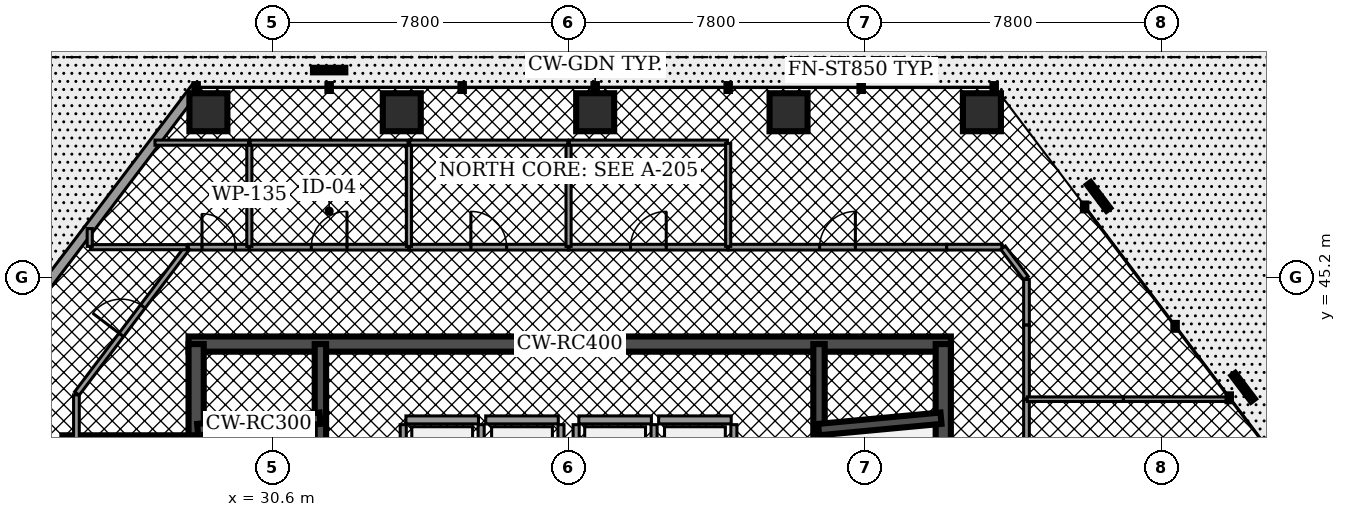
"""IFC4 building model, lengths in metres.
Left out: names, types, materials, properties, quantities, classifications, styles, units other than length and angle.
Written with IfcOpenShell. Run it as: python <this file> out.ifc"""

import sys

from ifc_helpers import new_model, si_unit, direction, frame, frame_2d, origin, origin_2d, place, context, subcontext, project, spatial, rectangle, hollow_rectangle, extrude, element, fill, save


model = new_model("IFC4")
c1 = context("Model", 3, precision=1e-05, world=origin(), true_north=direction((0.0, 1.0)))
c2 = subcontext(c1, "Body", "Model", "MODEL_VIEW")
j1 = project(units=[si_unit("LENGTHUNIT", "METRE"), si_unit("PLANEANGLEUNIT", "RADIAN")], contexts=[c1])
p1 = place(None, origin())
s1 = spatial("IfcSite", under=j1, at=p1, CompositionType="ELEMENT")
p2 = place(p1, origin())
s2 = spatial("IfcBuilding", under=s1, at=p2, CompositionType="ELEMENT")
p3 = place(p2, frame((0.0, 0.0, 22.78)))
s3 = spatial("IfcBuildingStorey", under=s2, at=p3, CompositionType="ELEMENT", Elevation=22.78)
p4 = place(p3, frame((28.4, 43.45, 0.0), z_axis=(0.0, 0.0, 1.0), x_axis=(1.0, 0.0, 0.0)))
e1 = element("IfcWall", 1, at=p4, inside=s3, PredefinedType="SHEAR", context=c2, shape_type="SweptSolid", body=[
    extrude(rectangle(XDim=20.06, YDim=0.4, at=frame_2d((10.03, 0.0))), origin(), (0.0, 0.0, 1.0), 4.5),
])
p5 = place(p3, frame((28.6, 33.25, 0.0), z_axis=(0.0, 0.0, 1.0), x_axis=(0.0, 1.0, 0.0)))
e2 = element("IfcWall", 2, at=p5, inside=s3, PredefinedType="SHEAR", context=c2, shape_type="SweptSolid", body=[
    extrude(rectangle(XDim=10.2, YDim=0.4, at=frame_2d((5.1, 0.0))), origin(), (0.0, 0.0, 1.0), 4.5),
])
for number, where, z_axis, x_axis in (
    (3, (31.87, 33.25, 0.0), (0.0, 0.0, 1.0), (0.0, 1.0, 0.0)),
    (4, (44.99, 33.25, 0.0), (0.0, 0.0, 1.0), (0.0, 1.0, 0.0)),
):
    element("IfcWall", number, at=place(p3, frame(where, z_axis=z_axis, x_axis=x_axis)), inside=s3, PredefinedType="SHEAR", context=c2, shape_type="SweptSolid", body=[
        extrude(rectangle(XDim=10.2, YDim=0.3, at=frame_2d((5.1, 0.0))), origin(), (0.0, 0.0, 1.0), 4.5),
    ])
p6 = place(p3, frame((48.26, 33.25, 0.0), z_axis=(0.0, 0.0, 1.0), x_axis=(0.0, 1.0, 0.0)))
e5 = element("IfcWall", 5, at=p6, inside=s3, PredefinedType="SHEAR", context=c2, shape_type="SweptSolid", body=[
    extrude(rectangle(XDim=10.2, YDim=0.4, at=frame_2d((5.1, 0.0))), origin(), (0.0, 0.0, 1.0), 4.5),
])
p7 = place(p3, frame((28.64, 41.2, 0.0), z_axis=(0.0, 0.0, 1.0), x_axis=(0.995687118776, 0.092774789157, 0.0)))
e6 = element("IfcWall", 6, at=p7, inside=s3, PredefinedType="SHEAR", context=c2, shape_type="SweptSolid", body=[
    extrude(rectangle(XDim=3.234, YDim=0.3, at=frame_2d((1.617, 0.0))), origin(), (0.0, 0.0, 1.0), 4.5),
])
p8 = place(p3, frame((44.98, 41.2, 0.0), z_axis=(0.0, 0.0, 1.0), x_axis=(0.995686468965, 0.09278176286, 0.0)))
e7 = element("IfcWall", 7, at=p8, inside=s3, PredefinedType="SHEAR", context=c2, shape_type="SweptSolid", body=[
    extrude(rectangle(XDim=3.234, YDim=0.3, at=frame_2d((1.617, 0.0))), origin(), (0.0, 0.0, 1.0), 4.5),
])
p9 = place(p3, frame((25.08, 40.9, 0.0), z_axis=(0.0, 0.0, 1.0), x_axis=(1.0, 0.0, 0.0)))
e8 = element("IfcWall", 8, at=p9, inside=s3, PredefinedType="SHEAR", context=c2, shape_type="SweptSolid", body=[
    extrude(rectangle(XDim=3.52, YDim=0.3, at=frame_2d((1.76, 0.0))), origin(), (0.0, 0.0, 1.0), 4.5),
])
p10 = place(p3, frame((49.277, 49.55, 0.0), z_axis=(0.0420077433, -0.008672566359, 0.999079644521), x_axis=(0.202187723277, 0.979346784625, 0.0)))
e9 = element("IfcColumn", 9, at=p10, inside=s3, PredefinedType="COLUMN", context=c2, shape_type="SweptSolid", body=[
    extrude(hollow_rectangle(XDim=1.0, YDim=1.0, WallThickness=0.05, at=origin_2d()), origin(), (0.0, 0.0, 1.0), 4.504),
])
p11 = place(p3, frame((44.188, 49.55, 0.0), z_axis=(0.020448511934, -0.008678413553, 0.999753241304), x_axis=(0.390675254549, 0.920528568532, 0.0)))
e10 = element("IfcColumn", 10, at=p11, inside=s3, PredefinedType="COLUMN", context=c2, shape_type="SweptSolid", body=[
    extrude(hollow_rectangle(XDim=1.0, YDim=1.0, WallThickness=0.05, at=origin_2d()), origin(), (0.0, 0.0, 1.0), 4.501),
])
p12 = place(p3, frame((39.1, 49.55, 0.0), z_axis=(-0.001247781879, -0.008680221768, 0.999961547656), x_axis=(0.989825386618, -0.142287399326, 0.0)))
e11 = element("IfcColumn", 11, at=p12, inside=s3, PredefinedType="COLUMN", context=c2, shape_type="SweptSolid", body=[
    extrude(hollow_rectangle(XDim=1.0, YDim=1.0, WallThickness=0.05, at=origin_2d()), origin(), (0.0, 0.0, 1.0), 4.5),
])
p13 = place(p3, frame((34.011, 49.55, 0.0), z_axis=(-0.022888105236, -0.008677954592, 0.999700368982), x_axis=(0.354520640342, -0.935048188903, 0.0)))
e12 = element("IfcColumn", 12, at=p13, inside=s3, PredefinedType="COLUMN", context=c2, shape_type="SweptSolid", body=[
    extrude(hollow_rectangle(XDim=1.0, YDim=1.0, WallThickness=0.05, at=origin_2d()), origin(), (0.0, 0.0, 1.0), 4.501),
])
p14 = place(p3, frame((28.923, 49.55, 0.0), z_axis=(-0.044550397698, -0.008671610257, 0.998969501657), x_axis=(0.191061427152, -0.981578081996, 0.0)))
e13 = element("IfcColumn", 13, at=p14, inside=s3, PredefinedType="COLUMN", context=c2, shape_type="SweptSolid", body=[
    extrude(hollow_rectangle(XDim=1.0, YDim=1.0, WallThickness=0.05, at=origin_2d()), origin(), (0.0, 0.0, 1.0), 4.505),
])
p15 = place(p3, frame((16.0, 33.568, 0.0), z_axis=(0.0, 0.0, 1.0), x_axis=(0.603864446157, 0.797087028289, 0.0)))
e14 = element("IfcWall", 14, at=p15, inside=s3, PredefinedType="STANDARD", context=c2, shape_type="SweptSolid", body=[
    extrude(rectangle(XDim=20.866, YDim=0.26, at=frame_2d((10.433, 0.0))), origin(), (0.0, 0.0, 1.0), 3.65),
])
p16 = place(p15, frame((2.65, 0.0, 0.0)))
e15 = element("IfcOpeningElement", 15, at=p16, cuts=e14, PredefinedType="OPENING", context=c2, shape_type="SweptSolid", body=[
    extrude(rectangle(XDim=1.8, YDim=2.2, at=frame_2d((0.9, 1.1))), frame((0.0, 0.14, 0.0), z_axis=(0.0, -1.0, 0.0), x_axis=(1.0, 0.0, 0.0)), (0.0, 0.0, 1.0), 0.28),
])
p17 = place(p15, frame((5.3, 0.0, 0.75)))
e16 = element("IfcOpeningElement", 16, at=p17, cuts=e14, PredefinedType="OPENING", context=c2, shape_type="SweptSolid", body=[
    extrude(rectangle(XDim=2.1, YDim=2.2, at=frame_2d((1.05, 1.1))), frame((0.0, 0.14, 0.0), z_axis=(0.0, -1.0, 0.0), x_axis=(1.0, 0.0, 0.0)), (0.0, 0.0, 1.0), 0.28),
])
p18 = place(p3, frame((34.12, 41.455, 0.0), z_axis=(0.0, 0.0, 1.0), x_axis=(1.0, 0.0, 0.0)))
e17 = element("IfcWall", 17, at=p18, inside=s3, PredefinedType="SOLIDWALL", context=c2, shape_type="SweptSolid", body=[
    extrude(rectangle(XDim=1.91, YDim=0.21, at=frame_2d((0.955, 0.0))), origin(), (0.0, 0.0, 1.0), 3.472),
])
for number, where, z_axis, x_axis in (
    (18, (34.05, 39.12, 0.0), (0.0, 0.0, 1.0), (0.0, 1.0, 0.0)),
    (19, (36.1, 39.12, 0.0), (0.0, 0.0, 1.0), (0.0, 1.0, 0.0)),
):
    element("IfcWall", number, at=place(p3, frame(where, z_axis=z_axis, x_axis=x_axis)), inside=s3, PredefinedType="SOLIDWALL", context=c2, shape_type="SweptSolid", body=[
        extrude(rectangle(XDim=2.21, YDim=0.16, at=frame_2d((1.105, 0.0))), origin(), (0.0, 0.0, 1.0), 3.472),
    ])
p19 = place(p3, frame((36.22, 41.455, 0.0), z_axis=(0.0, 0.0, 1.0), x_axis=(1.0, 0.0, 0.0)))
e20 = element("IfcWall", 20, at=p19, inside=s3, PredefinedType="SOLIDWALL", context=c2, shape_type="SweptSolid", body=[
    extrude(rectangle(XDim=1.91, YDim=0.21, at=frame_2d((0.955, 0.0))), origin(), (0.0, 0.0, 1.0), 3.472),
])
p20 = place(p3, frame((38.2, 39.12, 0.0), z_axis=(0.0, 0.0, 1.0), x_axis=(0.0, 1.0, 0.0)))
e21 = element("IfcWall", 21, at=p20, inside=s3, PredefinedType="SOLIDWALL", context=c2, shape_type="SweptSolid", body=[
    extrude(rectangle(XDim=2.21, YDim=0.16, at=frame_2d((1.105, 0.0))), origin(), (0.0, 0.0, 1.0), 3.472),
])
p21 = place(p3, frame((38.67, 41.455, 0.0), z_axis=(0.0, 0.0, 1.0), x_axis=(1.0, 0.0, 0.0)))
e22 = element("IfcWall", 22, at=p21, inside=s3, PredefinedType="SOLIDWALL", context=c2, shape_type="SweptSolid", body=[
    extrude(rectangle(XDim=1.91, YDim=0.21, at=frame_2d((0.955, 0.0))), origin(), (0.0, 0.0, 1.0), 3.472),
])
for number, where, z_axis, x_axis in (
    (23, (38.6, 39.12, 0.0), (0.0, 0.0, 1.0), (0.0, 1.0, 0.0)),
    (24, (40.65, 39.12, 0.0), (0.0, 0.0, 1.0), (0.0, 1.0, 0.0)),
):
    element("IfcWall", number, at=place(p3, frame(where, z_axis=z_axis, x_axis=x_axis)), inside=s3, PredefinedType="SOLIDWALL", context=c2, shape_type="SweptSolid", body=[
        extrude(rectangle(XDim=2.21, YDim=0.16, at=frame_2d((1.105, 0.0))), origin(), (0.0, 0.0, 1.0), 3.472),
    ])
p22 = place(p3, frame((40.77, 41.455, 0.0), z_axis=(0.0, 0.0, 1.0), x_axis=(1.0, 0.0, 0.0)))
e25 = element("IfcWall", 25, at=p22, inside=s3, PredefinedType="SOLIDWALL", context=c2, shape_type="SweptSolid", body=[
    extrude(rectangle(XDim=1.91, YDim=0.21, at=frame_2d((0.955, 0.0))), origin(), (0.0, 0.0, 1.0), 3.472),
])
p23 = place(p3, frame((42.75, 39.12, 0.0), z_axis=(0.0, 0.0, 1.0), x_axis=(0.0, 1.0, 0.0)))
e26 = element("IfcWall", 26, at=p23, inside=s3, PredefinedType="SOLIDWALL", context=c2, shape_type="SweptSolid", body=[
    extrude(rectangle(XDim=2.21, YDim=0.16, at=frame_2d((1.105, 0.0))), origin(), (0.0, 0.0, 1.0), 3.472),
])
p24 = place(p3, frame((28.394, 46.0, 0.0), z_axis=(0.0, 0.0, 1.0), x_axis=(1.0, 0.0, 0.0)))
e27 = element("IfcWall", 27, at=p24, inside=s3, PredefinedType="PARTITIONING", context=c2, shape_type="SweptSolid", body=[
    extrude(rectangle(XDim=1.601, YDim=0.15, at=frame_2d((0.801, 0.0))), origin(), (0.0, 0.0, 1.0), 3.457),
])
p25 = place(p24, frame((0.361, 0.0, 0.0)))
e28 = element("IfcOpeningElement", 28, at=p25, cuts=e27, PredefinedType="OPENING", context=c2, shape_type="SweptSolid", body=[
    extrude(rectangle(XDim=0.88, YDim=2.05, at=frame_2d((0.44, 1.025))), frame((0.0, 0.085, 0.0), z_axis=(0.0, -1.0, 0.0), x_axis=(1.0, 0.0, 0.0)), (0.0, 0.0, 1.0), 0.17),
])
p26 = place(p3, frame((30.005, 46.0, 0.0), z_axis=(0.0, 0.0, 1.0), x_axis=(1.0, 0.0, 0.0)))
e29 = element("IfcWall", 29, at=p26, inside=s3, PredefinedType="PARTITIONING", context=c2, shape_type="SweptSolid", body=[
    extrude(rectangle(XDim=4.19, YDim=0.15, at=frame_2d((2.095, 0.0))), origin(), (0.0, 0.0, 1.0), 3.457),
])
p27 = place(p26, frame((1.625, 0.0, 0.0)))
e30 = element("IfcOpeningElement", 30, at=p27, cuts=e29, PredefinedType="OPENING", context=c2, shape_type="SweptSolid", body=[
    extrude(rectangle(XDim=0.94, YDim=2.05, at=frame_2d((0.47, 1.025))), frame((0.0, 0.085, 0.0), z_axis=(0.0, -1.0, 0.0), x_axis=(1.0, 0.0, 0.0)), (0.0, 0.0, 1.0), 0.17),
])
p28 = place(p3, frame((34.205, 46.0, 0.0), z_axis=(0.0, 0.0, 1.0), x_axis=(1.0, 0.0, 0.0)))
e31 = element("IfcWall", 31, at=p28, inside=s3, PredefinedType="PARTITIONING", context=c2, shape_type="SweptSolid", body=[
    extrude(rectangle(XDim=4.19, YDim=0.15, at=frame_2d((2.095, 0.0))), origin(), (0.0, 0.0, 1.0), 3.457),
])
p29 = place(p28, frame((1.625, 0.0, 0.0)))
e32 = element("IfcOpeningElement", 32, at=p29, cuts=e31, PredefinedType="OPENING", context=c2, shape_type="SweptSolid", body=[
    extrude(rectangle(XDim=0.94, YDim=2.05, at=frame_2d((0.47, 1.025))), frame((0.0, 0.085, 0.0), z_axis=(0.0, -1.0, 0.0), x_axis=(1.0, 0.0, 0.0)), (0.0, 0.0, 1.0), 0.17),
])
p30 = place(p3, frame((38.405, 46.0, 0.0), z_axis=(0.0, 0.0, 1.0), x_axis=(1.0, 0.0, 0.0)))
e33 = element("IfcWall", 33, at=p30, inside=s3, PredefinedType="PARTITIONING", context=c2, shape_type="SweptSolid", body=[
    extrude(rectangle(XDim=4.19, YDim=0.15, at=frame_2d((2.095, 0.0))), origin(), (0.0, 0.0, 1.0), 3.457),
])
p31 = place(p30, frame((1.625, 0.0, 0.0)))
e34 = element("IfcOpeningElement", 34, at=p31, cuts=e33, PredefinedType="OPENING", context=c2, shape_type="SweptSolid", body=[
    extrude(rectangle(XDim=0.94, YDim=2.05, at=frame_2d((0.47, 1.025))), frame((0.0, 0.085, 0.0), z_axis=(0.0, -1.0, 0.0), x_axis=(1.0, 0.0, 0.0)), (0.0, 0.0, 1.0), 0.17),
])
p32 = place(p3, frame((50.45, 32.005, 0.0), z_axis=(0.0, 0.0, 1.0), x_axis=(0.0, 1.0, 0.0)))
e35 = element("IfcWall", 35, at=p32, inside=s3, PredefinedType="PARTITIONING", context=c2, shape_type="SweptSolid", body=[
    extrude(rectangle(XDim=9.99, YDim=0.15, at=frame_2d((4.995, 0.0))), origin(), (0.0, 0.0, 1.0), 3.457),
])
p33 = place(p32, frame((4.525, 0.0, 0.0)))
e36 = element("IfcOpeningElement", 36, at=p33, cuts=e35, PredefinedType="OPENING", context=c2, shape_type="SweptSolid", body=[
    extrude(rectangle(XDim=0.94, YDim=2.05, at=frame_2d((0.47, 1.025))), frame((0.0, 0.085, 0.0), z_axis=(0.0, -1.0, 0.0), x_axis=(1.0, 0.0, 0.0)), (0.0, 0.0, 1.0), 0.17),
])
p34 = place(p3, frame((25.45, 40.915, 0.0), z_axis=(0.0, 0.0, 1.0), x_axis=(0.0, 1.0, 0.0)))
e37 = element("IfcWall", 37, at=p34, inside=s3, PredefinedType="PARTITIONING", context=c2, shape_type="SweptSolid", body=[
    extrude(rectangle(XDim=1.199, YDim=0.15, at=frame_2d((0.599, 0.0))), origin(), (0.0, 0.0, 1.0), 3.457),
])
p35 = place(p3, frame((25.462, 42.15, 0.0), z_axis=(0.0, 0.0, 1.0), x_axis=(0.60380980605, 0.797128420091, 0.0)))
e38 = element("IfcWall", 38, at=p35, inside=s3, PredefinedType="PARTITIONING", context=c2, shape_type="SweptSolid", body=[
    extrude(rectangle(XDim=4.81, YDim=0.15, at=frame_2d((2.405, 0.0))), origin(), (0.0, 0.0, 1.0), 3.457),
])
p36 = place(p35, frame((1.935, 0.0, 0.0)))
e39 = element("IfcOpeningElement", 39, at=p36, cuts=e38, PredefinedType="OPENING", context=c2, shape_type="SweptSolid", body=[
    extrude(rectangle(XDim=0.94, YDim=2.05, at=frame_2d((0.47, 1.025))), frame((0.0, 0.085, 0.0), z_axis=(0.0, -1.0, 0.0), x_axis=(1.0, 0.0, 0.0)), (0.0, 0.0, 1.0), 0.17),
])
p37 = place(p3, frame((42.605, 46.0, 0.0), z_axis=(0.0, 0.0, 1.0), x_axis=(1.0, 0.0, 0.0)))
e40 = element("IfcWall", 40, at=p37, inside=s3, PredefinedType="PARTITIONING", context=c2, shape_type="SweptSolid", body=[
    extrude(rectangle(XDim=5.745, YDim=0.15, at=frame_2d((2.873, 0.0))), origin(), (0.0, 0.0, 1.0), 3.457),
])
p38 = place(p37, frame((2.403, 0.0, 0.0)))
e41 = element("IfcOpeningElement", 41, at=p38, cuts=e40, PredefinedType="OPENING", context=c2, shape_type="SweptSolid", body=[
    extrude(rectangle(XDim=0.94, YDim=2.05, at=frame_2d((0.47, 1.025))), frame((0.0, 0.085, 0.0), z_axis=(0.0, -1.0, 0.0), x_axis=(1.0, 0.0, 0.0)), (0.0, 0.0, 1.0), 0.17),
])
p39 = place(p3, frame((48.35, 46.0, 0.0), z_axis=(0.0, 0.0, 1.0), x_axis=(1.0, 0.0, 0.0)))
e42 = element("IfcWall", 42, at=p39, inside=s3, PredefinedType="PARTITIONING", context=c2, shape_type="SweptSolid", body=[
    extrude(rectangle(XDim=1.451, YDim=0.15, at=frame_2d((0.726, 0.0))), origin(), (0.0, 0.0, 1.0), 3.457),
])
p40 = place(p3, frame((49.833, 45.984, 0.0), z_axis=(0.0, 0.0, 1.0), x_axis=(0.603815447154, -0.79712414703, 0.0)))
e43 = element("IfcWall", 43, at=p40, inside=s3, PredefinedType="PARTITIONING", context=c2, shape_type="SweptSolid", body=[
    extrude(rectangle(XDim=1.001, YDim=0.15, at=frame_2d((0.501, 0.0))), origin(), (0.0, 0.0, 1.0), 3.457),
])
p41 = place(p3, frame((50.45, 43.95, 0.0), z_axis=(0.0, 0.0, 1.0), x_axis=(0.0, 1.0, 0.0)))
e44 = element("IfcWall", 44, at=p41, inside=s3, PredefinedType="PARTITIONING", context=c2, shape_type="SweptSolid", body=[
    extrude(rectangle(XDim=1.2, YDim=0.15, at=frame_2d((0.6, 0.0))), origin(), (0.0, 0.0, 1.0), 3.457),
])
p42 = place(p3, frame((50.45, 42.005, 0.0), z_axis=(0.0, 0.0, 1.0), x_axis=(0.0, 1.0, 0.0)))
e45 = element("IfcWall", 45, at=p42, inside=s3, PredefinedType="PARTITIONING", context=c2, shape_type="SweptSolid", body=[
    extrude(rectangle(XDim=1.945, YDim=0.15, at=frame_2d((0.973, 0.0))), origin(), (0.0, 0.0, 1.0), 3.457),
])
p43 = place(p3, frame((30.0, 46.02, 0.0), z_axis=(0.0, 0.0, 1.0), x_axis=(0.0, 1.0, 0.0)))
e46 = element("IfcWall", 46, at=p43, inside=s3, PredefinedType="PARTITIONING", context=c2, shape_type="SweptSolid", body=[
    extrude(rectangle(XDim=2.71, YDim=0.135, at=frame_2d((1.355, 0.0))), origin(), (0.0, 0.0, 1.0), 3.457),
])
p44 = place(p3, frame((25.82, 46.0, 0.0), z_axis=(0.0, 0.0, 1.0), x_axis=(1.0, 0.0, 0.0)))
e47 = element("IfcWall", 47, at=p44, inside=s3, PredefinedType="PARTITIONING", context=c2, shape_type="SweptSolid", body=[
    extrude(rectangle(XDim=2.539, YDim=0.135, at=frame_2d((1.27, 0.0))), origin(), (0.0, 0.0, 1.0), 3.457),
])
p45 = place(p3, frame((25.8, 46.02, 0.0), z_axis=(0.0, 0.0, 1.0), x_axis=(0.0, 1.0, 0.0)))
e48 = element("IfcWall", 48, at=p45, inside=s3, PredefinedType="PARTITIONING", context=c2, shape_type="SweptSolid", body=[
    extrude(rectangle(XDim=0.469, YDim=0.135, at=frame_2d((0.234, 0.0))), origin(), (0.0, 0.0, 1.0), 3.457),
])
p46 = place(p3, frame((27.517, 48.75, 0.0), z_axis=(0.0, 0.0, 1.0), x_axis=(1.0, 0.0, 0.0)))
e49 = element("IfcWall", 49, at=p46, inside=s3, PredefinedType="PARTITIONING", context=c2, shape_type="SweptSolid", body=[
    extrude(rectangle(XDim=2.463, YDim=0.135, at=frame_2d((1.232, 0.0))), origin(), (0.0, 0.0, 1.0), 3.457),
])
p47 = place(p3, frame((34.2, 46.02, 0.0), z_axis=(0.0, 0.0, 1.0), x_axis=(0.0, 1.0, 0.0)))
e50 = element("IfcWall", 50, at=p47, inside=s3, PredefinedType="PARTITIONING", context=c2, shape_type="SweptSolid", body=[
    extrude(rectangle(XDim=2.71, YDim=0.135, at=frame_2d((1.355, 0.0))), origin(), (0.0, 0.0, 1.0), 3.457),
])
p48 = place(p3, frame((30.02, 48.75, 0.0), z_axis=(0.0, 0.0, 1.0), x_axis=(1.0, 0.0, 0.0)))
e51 = element("IfcWall", 51, at=p48, inside=s3, PredefinedType="PARTITIONING", context=c2, shape_type="SweptSolid", body=[
    extrude(rectangle(XDim=4.16, YDim=0.135, at=frame_2d((2.08, 0.0))), origin(), (0.0, 0.0, 1.0), 3.457),
])
p49 = place(p3, frame((38.4, 46.02, 0.0), z_axis=(0.0, 0.0, 1.0), x_axis=(0.0, 1.0, 0.0)))
e52 = element("IfcWall", 52, at=p49, inside=s3, PredefinedType="PARTITIONING", context=c2, shape_type="SweptSolid", body=[
    extrude(rectangle(XDim=2.71, YDim=0.135, at=frame_2d((1.355, 0.0))), origin(), (0.0, 0.0, 1.0), 3.457),
])
p50 = place(p3, frame((34.22, 48.75, 0.0), z_axis=(0.0, 0.0, 1.0), x_axis=(1.0, 0.0, 0.0)))
e53 = element("IfcWall", 53, at=p50, inside=s3, PredefinedType="PARTITIONING", context=c2, shape_type="SweptSolid", body=[
    extrude(rectangle(XDim=4.16, YDim=0.135, at=frame_2d((2.08, 0.0))), origin(), (0.0, 0.0, 1.0), 3.457),
])
p51 = place(p3, frame((38.42, 48.75, 0.0), z_axis=(0.0, 0.0, 1.0), x_axis=(1.0, 0.0, 0.0)))
e54 = element("IfcWall", 54, at=p51, inside=s3, PredefinedType="PARTITIONING", context=c2, shape_type="SweptSolid", body=[
    extrude(rectangle(XDim=4.16, YDim=0.135, at=frame_2d((2.08, 0.0))), origin(), (0.0, 0.0, 1.0), 3.457),
])
p52 = place(p3, frame((42.6, 46.02, 0.0), z_axis=(0.0, 0.0, 1.0), x_axis=(0.0, 1.0, 0.0)))
e55 = element("IfcWall", 55, at=p52, inside=s3, PredefinedType="PARTITIONING", context=c2, shape_type="SweptSolid", body=[
    extrude(rectangle(XDim=2.71, YDim=0.135, at=frame_2d((1.355, 0.0))), origin(), (0.0, 0.0, 1.0), 3.457),
])
p53 = place(p3, frame((50.47, 42.0, 0.0), z_axis=(0.0, 0.0, 1.0), x_axis=(1.0, 0.0, 0.0)))
e56 = element("IfcWall", 56, at=p53, inside=s3, PredefinedType="PARTITIONING", context=c2, shape_type="SweptSolid", body=[
    extrude(rectangle(XDim=2.53, YDim=0.12, at=frame_2d((1.265, 0.0))), origin(), (0.0, 0.0, 1.0), 3.457),
])
p54 = place(p3, frame((53.0, 42.0, 0.0), z_axis=(0.0, 0.0, 1.0), x_axis=(1.0, 0.0, 0.0)))
e57 = element("IfcWall", 57, at=p54, inside=s3, PredefinedType="PARTITIONING", context=c2, shape_type="SweptSolid", body=[
    extrude(rectangle(XDim=2.797, YDim=0.12, at=frame_2d((1.398, 0.0))), origin(), (0.0, 0.0, 1.0), 3.457),
])
p55 = place(p25, origin())
e58 = element("IfcDoor", 58, at=p55, inside=s3, OperationType="SINGLE_SWING_LEFT", PredefinedType="DOOR", context=c2, shape_type="SweptSolid", body=[
    extrude(rectangle(XDim=0.88, YDim=2.05, at=frame_2d((0.44, 1.025))), frame((0.0, 0.025, 0.0), z_axis=(0.0, -1.0, 0.0), x_axis=(1.0, 0.0, 0.0)), (0.0, 0.0, 1.0), 0.05),
])
fill(e28, e58)
p56 = place(p27, origin())
e59 = element("IfcDoor", 59, at=p56, inside=s3, OperationType="SINGLE_SWING_RIGHT", PredefinedType="DOOR", context=c2, shape_type="SweptSolid", body=[
    extrude(rectangle(XDim=0.94, YDim=2.05, at=frame_2d((0.47, 1.025))), frame((0.0, 0.025, 0.0), z_axis=(0.0, -1.0, 0.0), x_axis=(1.0, 0.0, 0.0)), (0.0, 0.0, 1.0), 0.05),
])
fill(e30, e59)
p57 = place(p29, origin())
e60 = element("IfcDoor", 60, at=p57, inside=s3, OperationType="SINGLE_SWING_LEFT", PredefinedType="DOOR", context=c2, shape_type="SweptSolid", body=[
    extrude(rectangle(XDim=0.94, YDim=2.05, at=frame_2d((0.47, 1.025))), frame((0.0, 0.025, 0.0), z_axis=(0.0, -1.0, 0.0), x_axis=(1.0, 0.0, 0.0)), (0.0, 0.0, 1.0), 0.05),
])
fill(e32, e60)
p58 = place(p31, origin())
e61 = element("IfcDoor", 61, at=p58, inside=s3, OperationType="SINGLE_SWING_RIGHT", PredefinedType="DOOR", context=c2, shape_type="SweptSolid", body=[
    extrude(rectangle(XDim=0.94, YDim=2.05, at=frame_2d((0.47, 1.025))), frame((0.0, 0.025, 0.0), z_axis=(0.0, -1.0, 0.0), x_axis=(1.0, 0.0, 0.0)), (0.0, 0.0, 1.0), 0.05),
])
fill(e34, e61)
p59 = place(p36, origin())
e62 = element("IfcDoor", 62, at=p59, inside=s3, OperationType="SINGLE_SWING_LEFT", PredefinedType="DOOR", context=c2, shape_type="SweptSolid", body=[
    extrude(rectangle(XDim=0.94, YDim=2.05, at=frame_2d((0.47, 1.025))), frame((0.0, 0.025, 0.0), z_axis=(0.0, -1.0, 0.0), x_axis=(1.0, 0.0, 0.0)), (0.0, 0.0, 1.0), 0.05),
])
fill(e39, e62)
p60 = place(p38, origin())
e63 = element("IfcDoor", 63, at=p60, inside=s3, OperationType="SINGLE_SWING_RIGHT", PredefinedType="DOOR", context=c2, shape_type="SweptSolid", body=[
    extrude(rectangle(XDim=0.94, YDim=2.05, at=frame_2d((0.47, 1.025))), frame((0.0, 0.025, 0.0), z_axis=(0.0, -1.0, 0.0), x_axis=(1.0, 0.0, 0.0)), (0.0, 0.0, 1.0), 0.05),
])
fill(e41, e63)
save(model, sys.argv[1])
